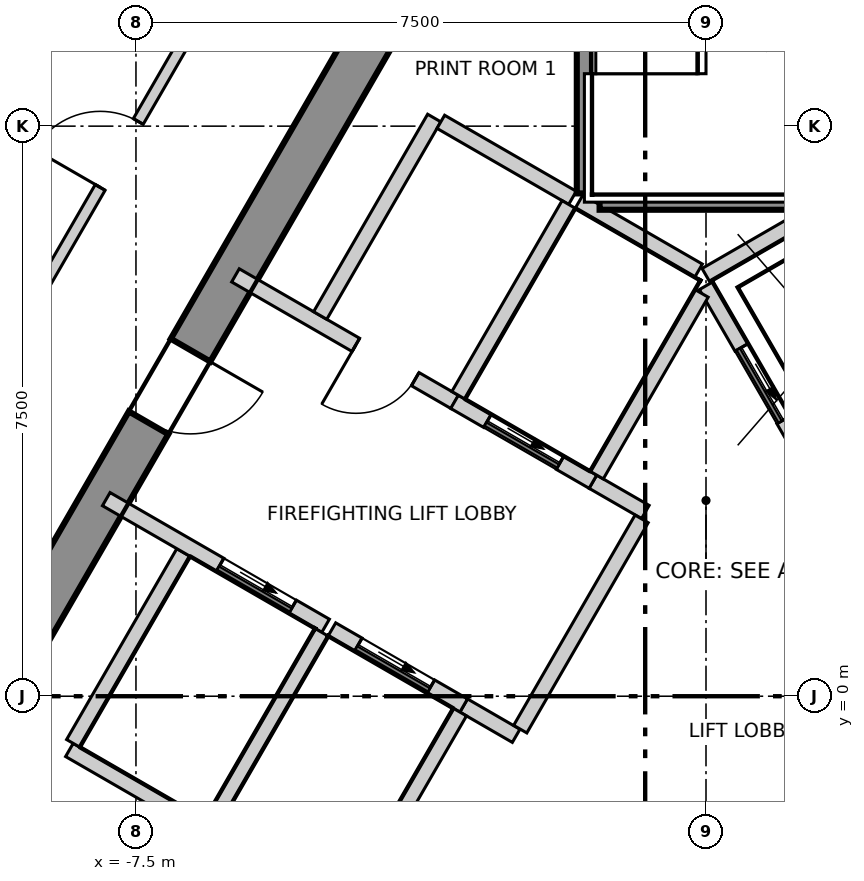
"""IFC4 building model, lengths in metres.
Left out: names, types, materials, properties, quantities, classifications, styles, units other than length and angle.
Written with IfcOpenShell. Run it as: python <this file> out.ifc"""

import sys

from ifc_helpers import new_model, si_unit, direction, frame, frame_2d, origin, place, context, subcontext, project, spatial, polyline, rectangle, outline, extrude, element, fill, save


model = new_model("IFC4")
c1 = context("Model", 3, precision=1e-05, world=origin(), true_north=direction((0.0, 1.0)))
c2 = subcontext(c1, "Body", "Model", "MODEL_VIEW")
j1 = project(units=[si_unit("LENGTHUNIT", "METRE"), si_unit("PLANEANGLEUNIT", "RADIAN")], contexts=[c1])
p1 = place(None, origin())
s1 = spatial("IfcSite", under=j1, at=p1, CompositionType="ELEMENT")
p2 = place(p1, origin())
s2 = spatial("IfcBuilding", under=s1, at=p2, CompositionType="ELEMENT")
p3 = place(p2, frame((0.0, 0.0, 268.3)))
s3 = spatial("IfcBuildingStorey", under=s2, at=p3, CompositionType="ELEMENT", Elevation=268.3)
p4 = place(p3, frame((-1.732, 13.3, -0.3), z_axis=(0.0, 0.0, 1.0), x_axis=(-0.500000539815, -0.866025092122, 0.0)))
e1 = element("IfcWall", 1, at=p4, inside=s3, PredefinedType="SHEAR", context=c2, shape_type="SweptSolid", body=[
    extrude(outline(polyline([(-0.173, -0.3), (1.795, -0.3), (3.763, -0.3), (5.732, -0.3), (7.7, -0.3), (9.668, -0.301), (11.637, -0.301), (13.605, -0.301), (15.573, -0.301), (17.542, -0.301), (19.51, -0.301), (21.478, -0.301), (21.131, 0.3), (19.226, 0.3), (17.321, 0.3), (15.415, 0.3), (13.51, 0.3), (11.605, 0.3), (9.699, 0.3), (7.794, 0.3), (5.889, 0.3), (3.984, 0.3), (2.078, 0.3), (0.173, 0.3), (-0.173, -0.3)])), origin(), (0.0, 0.0, 1.0), 3.6),
])
p5 = place(p4, frame((10.102, 0.0, 0.3)))
e2 = element("IfcOpeningElement", 2, at=p5, cuts=e1, PredefinedType="OPENING", context=c2, shape_type="SweptSolid", body=[
    extrude(rectangle(XDim=1.1, YDim=2.1, at=frame_2d((0.55, 1.05))), frame((0.0, 0.31, 0.0), z_axis=(0.0, -1.0, 0.0), x_axis=(1.0, 0.0, 0.0)), (0.0, 0.0, 1.0), 0.621),
])
p6 = place(p4, frame((16.378, 0.0, 0.3)))
e3 = element("IfcOpeningElement", 3, at=p6, cuts=e1, PredefinedType="OPENING", context=c2, shape_type="SweptSolid", body=[
    extrude(rectangle(XDim=0.9, YDim=2.1, at=frame_2d((0.45, 1.05))), frame((0.0, 0.31, 0.0), z_axis=(0.0, -1.0, 0.0), x_axis=(1.0, 0.0, 0.0)), (0.0, 0.0, 1.0), 0.621),
])
p7 = place(p4, frame((4.026, 0.0, 0.3)))
e4 = element("IfcOpeningElement", 4, at=p7, cuts=e1, PredefinedType="OPENING", context=c2, shape_type="SweptSolid", body=[
    extrude(rectangle(XDim=0.9, YDim=2.1, at=frame_2d((0.45, 1.05))), frame((0.0, 0.31, 0.0), z_axis=(0.0, -1.0, 0.0), x_axis=(1.0, 0.0, 0.0)), (0.0, 0.0, 1.0), 0.621),
])
p8 = place(p3, frame((-2.577, 28.771, 0.0), z_axis=(0.0, 0.0, 1.0), x_axis=(-0.49999909388, -0.866025926932, 0.0)))
e5 = element("IfcWall", 5, at=p8, inside=s3, PredefinedType="ELEMENTEDWALL", context=c2, shape_type="SweptSolid", body=[
    extrude(rectangle(XDim=47.236, YDim=0.2, at=frame_2d((23.618, 0.0))), origin(), (0.0, 0.0, 1.0), 3.3),
])
p9 = place(p8, frame((2.243, 0.0, 0.9)))
e6 = element("IfcOpeningElement", 6, at=p9, cuts=e5, PredefinedType="OPENING", context=c2, shape_type="SweptSolid", body=[
    extrude(rectangle(XDim=3.7, YDim=2.2, at=frame_2d((1.85, 1.1))), frame((0.0, 0.11, 0.0), z_axis=(0.0, -1.0, 0.0), x_axis=(1.0, 0.0, 0.0)), (0.0, 0.0, 1.0), 0.22),
])
p10 = place(p8, frame((7.824, 0.0, 0.9)))
e7 = element("IfcOpeningElement", 7, at=p10, cuts=e5, PredefinedType="OPENING", context=c2, shape_type="SweptSolid", body=[
    extrude(rectangle(XDim=3.7, YDim=2.2, at=frame_2d((1.85, 1.1))), frame((0.0, 0.11, 0.0), z_axis=(0.0, -1.0, 0.0), x_axis=(1.0, 0.0, 0.0)), (0.0, 0.0, 1.0), 0.22),
])
p11 = place(p8, frame((13.406, 0.0, 0.9)))
e8 = element("IfcOpeningElement", 8, at=p11, cuts=e5, PredefinedType="OPENING", context=c2, shape_type="SweptSolid", body=[
    extrude(rectangle(XDim=3.7, YDim=2.2, at=frame_2d((1.85, 1.1))), frame((0.0, 0.11, 0.0), z_axis=(0.0, -1.0, 0.0), x_axis=(1.0, 0.0, 0.0)), (0.0, 0.0, 1.0), 0.22),
])
p12 = place(p8, frame((18.987, 0.0, 0.9)))
e9 = element("IfcOpeningElement", 9, at=p12, cuts=e5, PredefinedType="OPENING", context=c2, shape_type="SweptSolid", body=[
    extrude(rectangle(XDim=3.7, YDim=2.2, at=frame_2d((1.85, 1.1))), frame((0.0, 0.11, 0.0), z_axis=(0.0, -1.0, 0.0), x_axis=(1.0, 0.0, 0.0)), (0.0, 0.0, 1.0), 0.22),
])
p13 = place(p8, frame((24.569, 0.0, 0.9)))
e10 = element("IfcOpeningElement", 10, at=p13, cuts=e5, PredefinedType="OPENING", context=c2, shape_type="SweptSolid", body=[
    extrude(rectangle(XDim=3.7, YDim=2.2, at=frame_2d((1.85, 1.1))), frame((0.0, 0.11, 0.0), z_axis=(0.0, -1.0, 0.0), x_axis=(1.0, 0.0, 0.0)), (0.0, 0.0, 1.0), 0.22),
])
p14 = place(p8, frame((30.15, 0.0, 0.9)))
e11 = element("IfcOpeningElement", 11, at=p14, cuts=e5, PredefinedType="OPENING", context=c2, shape_type="SweptSolid", body=[
    extrude(rectangle(XDim=3.7, YDim=2.2, at=frame_2d((1.85, 1.1))), frame((0.0, 0.11, 0.0), z_axis=(0.0, -1.0, 0.0), x_axis=(1.0, 0.0, 0.0)), (0.0, 0.0, 1.0), 0.22),
])
p15 = place(p8, frame((35.731, 0.0, 0.9)))
e12 = element("IfcOpeningElement", 12, at=p15, cuts=e5, PredefinedType="OPENING", context=c2, shape_type="SweptSolid", body=[
    extrude(rectangle(XDim=3.7, YDim=2.2, at=frame_2d((1.85, 1.1))), frame((0.0, 0.11, 0.0), z_axis=(0.0, -1.0, 0.0), x_axis=(1.0, 0.0, 0.0)), (0.0, 0.0, 1.0), 0.22),
])
p16 = place(p8, frame((41.313, 0.0, 0.9)))
e13 = element("IfcOpeningElement", 13, at=p16, cuts=e5, PredefinedType="OPENING", context=c2, shape_type="SweptSolid", body=[
    extrude(rectangle(XDim=3.7, YDim=2.2, at=frame_2d((1.85, 1.1))), frame((0.0, 0.11, 0.0), z_axis=(0.0, -1.0, 0.0), x_axis=(1.0, 0.0, 0.0)), (0.0, 0.0, 1.0), 0.22),
])
p17 = place(p3, frame((-17.678, -10.12, 0.0), z_axis=(0.0, 0.0, 1.0), x_axis=(0.49998824015, 0.86603219323, 0.0)))
e14 = element("IfcWall", 14, at=p17, inside=s3, PredefinedType="PARTITIONING", context=c2, shape_type="SweptSolid", body=[
    extrude(rectangle(XDim=35.357, YDim=0.15, at=frame_2d((17.678, 0.0))), origin(), (0.0, 0.0, 1.0), 3.3),
])
p18 = place(p17, frame((31.607, 0.0, 0.0)))
e15 = element("IfcOpeningElement", 15, at=p18, cuts=e14, PredefinedType="OPENING", context=c2, shape_type="SweptSolid", body=[
    extrude(rectangle(XDim=1.0, YDim=2.1, at=frame_2d((0.5, 1.05))), frame((0.0, 0.085, 0.0), z_axis=(0.0, -1.0, 0.0), x_axis=(1.0, 0.0, 0.0)), (0.0, 0.0, 1.0), 0.17),
])
p19 = place(p17, frame((19.416, 0.0, 0.0)))
e16 = element("IfcOpeningElement", 16, at=p19, cuts=e14, PredefinedType="OPENING", context=c2, shape_type="SweptSolid", body=[
    extrude(rectangle(XDim=1.0, YDim=2.1, at=frame_2d((0.5, 1.05))), frame((0.0, 0.085, 0.0), z_axis=(0.0, -1.0, 0.0), x_axis=(1.0, 0.0, 0.0)), (0.0, 0.0, 1.0), 0.17),
])
p20 = place(p17, frame((24.916, 0.0, 0.0)))
e17 = element("IfcOpeningElement", 17, at=p20, cuts=e14, PredefinedType="OPENING", context=c2, shape_type="SweptSolid", body=[
    extrude(rectangle(XDim=0.9, YDim=2.1, at=frame_2d((0.45, 1.05))), frame((0.0, 0.085, 0.0), z_axis=(0.0, -1.0, 0.0), x_axis=(1.0, 0.0, 0.0)), (0.0, 0.0, 1.0), 0.17),
])
p21 = place(p17, frame((22.816, 0.0, 0.0)))
e18 = element("IfcOpeningElement", 18, at=p21, cuts=e14, PredefinedType="OPENING", context=c2, shape_type="SweptSolid", body=[
    extrude(rectangle(XDim=0.9, YDim=2.1, at=frame_2d((0.45, 1.05))), frame((0.0, 0.085, 0.0), z_axis=(0.0, -1.0, 0.0), x_axis=(1.0, 0.0, 0.0)), (0.0, 0.0, 1.0), 0.17),
])
p22 = place(p17, frame((14.654, 0.0, 0.0)))
e19 = element("IfcOpeningElement", 19, at=p22, cuts=e14, PredefinedType="OPENING", context=c2, shape_type="SweptSolid", body=[
    extrude(rectangle(XDim=1.0, YDim=2.1, at=frame_2d((0.5, 1.05))), frame((0.0, 0.085, 0.0), z_axis=(0.0, -1.0, 0.0), x_axis=(1.0, 0.0, 0.0)), (0.0, 0.0, 1.0), 0.17),
])
p23 = place(p17, frame((7.672, 0.0, 0.0)))
e20 = element("IfcOpeningElement", 20, at=p23, cuts=e14, PredefinedType="OPENING", context=c2, shape_type="SweptSolid", body=[
    extrude(rectangle(XDim=1.0, YDim=2.1, at=frame_2d((0.5, 1.05))), frame((0.0, 0.085, 0.0), z_axis=(0.0, -1.0, 0.0), x_axis=(1.0, 0.0, 0.0)), (0.0, 0.0, 1.0), 0.17),
])
p24 = place(p17, frame((2.69, 0.0, 0.0)))
e21 = element("IfcOpeningElement", 21, at=p24, cuts=e14, PredefinedType="OPENING", context=c2, shape_type="SweptSolid", body=[
    extrude(rectangle(XDim=1.0, YDim=2.1, at=frame_2d((0.5, 1.05))), frame((0.0, 0.085, 0.0), z_axis=(0.0, -1.0, 0.0), x_axis=(1.0, 0.0, 0.0)), (0.0, 0.0, 1.0), 0.17),
])
p25 = place(p3, frame((0.075, 20.37, 0.0), z_axis=(0.0, 0.0, 1.0), x_axis=(0.499988971979, -0.866031770721, 0.0)))
e22 = element("IfcWall", 22, at=p25, inside=s3, PredefinedType="PARTITIONING", context=c2, shape_type="SweptSolid", body=[
    extrude(rectangle(XDim=35.207, YDim=0.15, at=frame_2d((17.604, 0.0))), origin(), (0.0, 0.0, 1.0), 3.3),
])
p26 = place(p25, frame((31.606, 0.0, 0.0)))
e23 = element("IfcOpeningElement", 23, at=p26, cuts=e22, PredefinedType="OPENING", context=c2, shape_type="SweptSolid", body=[
    extrude(rectangle(XDim=1.0, YDim=2.1, at=frame_2d((0.5, 1.05))), frame((0.0, 0.085, 0.0), z_axis=(0.0, -1.0, 0.0), x_axis=(1.0, 0.0, 0.0)), (0.0, 0.0, 1.0), 0.17),
])
p27 = place(p25, frame((24.316, 0.0, 0.0)))
e24 = element("IfcOpeningElement", 24, at=p27, cuts=e22, PredefinedType="OPENING", context=c2, shape_type="SweptSolid", body=[
    extrude(rectangle(XDim=1.0, YDim=2.1, at=frame_2d((0.5, 1.05))), frame((0.0, 0.085, 0.0), z_axis=(0.0, -1.0, 0.0), x_axis=(1.0, 0.0, 0.0)), (0.0, 0.0, 1.0), 0.17),
])
p28 = place(p25, frame((18.735, 0.0, 0.0)))
e25 = element("IfcOpeningElement", 25, at=p28, cuts=e22, PredefinedType="OPENING", context=c2, shape_type="SweptSolid", body=[
    extrude(rectangle(XDim=1.0, YDim=2.1, at=frame_2d((0.5, 1.05))), frame((0.0, 0.085, 0.0), z_axis=(0.0, -1.0, 0.0), x_axis=(1.0, 0.0, 0.0)), (0.0, 0.0, 1.0), 0.17),
])
p29 = place(p25, frame((8.154, 0.0, 0.0)))
e26 = element("IfcOpeningElement", 26, at=p29, cuts=e22, PredefinedType="OPENING", context=c2, shape_type="SweptSolid", body=[
    extrude(rectangle(XDim=1.0, YDim=2.1, at=frame_2d((0.5, 1.05))), frame((0.0, 0.085, 0.0), z_axis=(0.0, -1.0, 0.0), x_axis=(1.0, 0.0, 0.0)), (0.0, 0.0, 1.0), 0.17),
])
p30 = place(p25, frame((13.754, 0.0, 0.0)))
e27 = element("IfcOpeningElement", 27, at=p30, cuts=e22, PredefinedType="OPENING", context=c2, shape_type="SweptSolid", body=[
    extrude(rectangle(XDim=0.9, YDim=2.1, at=frame_2d((0.45, 1.05))), frame((0.0, 0.085, 0.0), z_axis=(0.0, -1.0, 0.0), x_axis=(1.0, 0.0, 0.0)), (0.0, 0.0, 1.0), 0.17),
])
p31 = place(p25, frame((11.554, 0.0, 0.0)))
e28 = element("IfcOpeningElement", 28, at=p31, cuts=e22, PredefinedType="OPENING", context=c2, shape_type="SweptSolid", body=[
    extrude(rectangle(XDim=0.9, YDim=2.1, at=frame_2d((0.45, 1.05))), frame((0.0, 0.085, 0.0), z_axis=(0.0, -1.0, 0.0), x_axis=(1.0, 0.0, 0.0)), (0.0, 0.0, 1.0), 0.17),
])
p32 = place(p25, frame((2.69, 0.0, 0.0)))
e29 = element("IfcOpeningElement", 29, at=p32, cuts=e22, PredefinedType="OPENING", context=c2, shape_type="SweptSolid", body=[
    extrude(rectangle(XDim=1.0, YDim=2.1, at=frame_2d((0.5, 1.05))), frame((0.0, 0.085, 0.0), z_axis=(0.0, -1.0, 0.0), x_axis=(1.0, 0.0, 0.0)), (0.0, 0.0, 1.0), 0.17),
])
p33 = place(p3, frame((-8.376, -0.707, 0.0), z_axis=(0.0, 0.0, 1.0), x_axis=(0.866067520717, -0.499927044236, 0.0)))
e30 = element("IfcWall", 30, at=p33, inside=s3, PredefinedType="SOLIDWALL", context=c2, shape_type="SweptSolid", body=[
    extrude(rectangle(XDim=2.1, YDim=0.2, at=frame_2d((1.05, 0.0))), origin(), (0.0, 0.0, 1.0), 3.3),
])
p34 = place(p3, frame((-8.326, -0.62, 0.0), z_axis=(0.0, 0.0, 1.0), x_axis=(0.500023687443, 0.866011727401, 0.0)))
e31 = element("IfcWall", 31, at=p34, inside=s3, PredefinedType="SOLIDWALL", context=c2, shape_type="SweptSolid", body=[
    extrude(rectangle(XDim=2.9, YDim=0.2, at=frame_2d((1.45, 0.0))), origin(), (0.0, 0.0, 1.0), 3.3),
])
p35 = place(p3, frame((-0.002, 5.541, 0.0), z_axis=(0.0, 0.0, 1.0), x_axis=(0.86600155993, 0.500041296494, 0.0)))
e32 = element("IfcWall", 32, at=p35, inside=s3, PredefinedType="SOLIDWALL", context=c2, shape_type="SweptSolid", body=[
    extrude(rectangle(XDim=4.132, YDim=0.2, at=frame_2d((2.066, 0.0))), origin(), (0.0, 0.0, 1.0), 3.3),
])
p36 = place(p3, frame((0.0, 5.4, 0.0), z_axis=(0.0, 0.0, 1.0), x_axis=(0.500103862429, -0.865965430478, 0.0)))
e33 = element("IfcWall", 33, at=p36, inside=s3, PredefinedType="SOLIDWALL", context=c2, shape_type="SweptSolid", body=[
    extrude(rectangle(XDim=2.973, YDim=0.2, at=frame_2d((1.487, 0.0))), origin(), (0.0, 0.0, 1.0), 3.3),
])
p37 = place(p36, frame((0.937, 0.0, 0.0)))
e34 = element("IfcOpeningElement", 34, at=p37, cuts=e33, PredefinedType="OPENING", context=c2, shape_type="SweptSolid", body=[
    extrude(rectangle(XDim=1.1, YDim=2.1, at=frame_2d((0.55, 1.05))), frame((0.0, 0.11, 0.0), z_axis=(0.0, -1.0, 0.0), x_axis=(1.0, 0.0, 0.0)), (0.0, 0.0, 1.0), 0.22),
])
p38 = place(p3, frame((-7.891, 2.593, 0.0), z_axis=(0.0, 0.0, 1.0), x_axis=(0.866070917804, -0.499921159118, 0.0)))
e35 = element("IfcWall", 35, at=p38, inside=s3, PredefinedType="SOLIDWALL", context=c2, shape_type="SweptSolid", body=[
    extrude(rectangle(XDim=3.333, YDim=0.2, at=frame_2d((1.666, 0.0))), origin(), (0.0, 0.0, 1.0), 3.3),
])
p39 = place(p38, frame((1.73, 0.0, 0.0)))
e36 = element("IfcOpeningElement", 36, at=p39, cuts=e35, PredefinedType="OPENING", context=c2, shape_type="SweptSolid", body=[
    extrude(rectangle(XDim=1.1, YDim=2.1, at=frame_2d((0.55, 1.05))), frame((0.0, 0.11, 0.0), z_axis=(0.0, -1.0, 0.0), x_axis=(1.0, 0.0, 0.0)), (0.0, 0.0, 1.0), 0.22),
])
p40 = place(p3, frame((-3.188, -0.122, 0.0), z_axis=(0.0, 0.0, 1.0), x_axis=(0.865705793592, -0.50055317294, 0.0)))
e37 = element("IfcWall", 37, at=p40, inside=s3, PredefinedType="SOLIDWALL", context=c2, shape_type="SweptSolid", body=[
    extrude(rectangle(XDim=0.797, YDim=0.2, at=frame_2d((0.398, 0.0))), origin(), (0.0, 0.0, 1.0), 3.3),
])
p41 = place(p3, frame((-6.191, 5.537, 0.0), z_axis=(0.0, 0.0, 1.0), x_axis=(0.866052607023, -0.499952879648, 0.0)))
e38 = element("IfcWall", 38, at=p41, inside=s3, PredefinedType="SOLIDWALL", context=c2, shape_type="SweptSolid", body=[
    extrude(rectangle(XDim=3.332, YDim=0.2, at=frame_2d((1.666, 0.0))), origin(), (0.0, 0.0, 1.0), 3.3),
])
p42 = place(p41, frame((1.83, 0.0, 0.0)))
e39 = element("IfcOpeningElement", 39, at=p42, cuts=e38, PredefinedType="OPENING", context=c2, shape_type="SweptSolid", body=[
    extrude(rectangle(XDim=0.9, YDim=2.1, at=frame_2d((0.45, 1.05))), frame((0.0, 0.11, 0.0), z_axis=(0.0, -1.0, 0.0), x_axis=(1.0, 0.0, 0.0)), (0.0, 0.0, 1.0), 0.22),
])
p43 = place(p3, frame((-1.488, 2.822, 0.0), z_axis=(0.0, 0.0, 1.0), x_axis=(0.866236612152, -0.499633997809, 0.0)))
e40 = element("IfcWall", 40, at=p43, inside=s3, PredefinedType="SOLIDWALL", context=c2, shape_type="SweptSolid", body=[
    extrude(rectangle(XDim=0.796, YDim=0.2, at=frame_2d((0.398, 0.0))), origin(), (0.0, 0.0, 1.0), 3.3),
])
p44 = place(p3, frame((-5.076, 5.009, 0.0), z_axis=(0.0, 0.0, 1.0), x_axis=(0.50002537861, 0.866010750942, 0.0)))
e41 = element("IfcWall", 41, at=p44, inside=s3, PredefinedType="SOLIDWALL", context=c2, shape_type="SweptSolid", body=[
    extrude(rectangle(XDim=3.0, YDim=0.2, at=frame_2d((1.5, 0.0))), origin(), (0.0, 0.0, 1.0), 3.3),
])
p45 = place(p3, frame((-3.489, 7.557, 0.0), z_axis=(0.0, 0.0, 1.0), x_axis=(0.866010750942, -0.50002537861, 0.0)))
e42 = element("IfcWall", 42, at=p45, inside=s3, PredefinedType="SOLIDWALL", context=c2, shape_type="SweptSolid", body=[
    extrude(rectangle(XDim=2.0, YDim=0.2, at=frame_2d((1.0, 0.0))), origin(), (0.0, 0.0, 1.0), 3.3),
])
p46 = place(p3, frame((-2.444, -0.433, 0.0), z_axis=(0.0, 0.0, 1.0), x_axis=(0.500035624827, 0.866004834804, 0.0)))
e43 = element("IfcWall", 43, at=p46, inside=s3, PredefinedType="SOLIDWALL", context=c2, shape_type="SweptSolid", body=[
    extrude(rectangle(XDim=3.194, YDim=0.2, at=frame_2d((1.597, 0.0))), origin(), (0.0, 0.0, 1.0), 3.3),
])
p47 = place(p3, frame((-6.507, -1.67, 0.0), z_axis=(0.0, 0.0, 1.0), x_axis=(0.50012328804, 0.865954211699, 0.0)))
e44 = element("IfcWall", 44, at=p47, inside=s3, PredefinedType="SOLIDWALL", context=c2, shape_type="SweptSolid", body=[
    extrude(rectangle(XDim=2.9, YDim=0.2, at=frame_2d((1.45, 0.0))), origin(), (0.0, 0.0, 1.0), 3.3),
])
p48 = place(p3, frame((-4.922, 0.879, 0.0), z_axis=(0.0, 0.0, 1.0), x_axis=(0.866073918653, -0.499915960366, 0.0)))
e45 = element("IfcWall", 45, at=p48, inside=s3, PredefinedType="SOLIDWALL", context=c2, shape_type="SweptSolid", body=[
    extrude(rectangle(XDim=2.002, YDim=0.2, at=frame_2d((1.001, 0.0))), origin(), (0.0, 0.0, 1.0), 3.3),
])
p49 = place(p48, frame((0.402, 0.0, 0.0)))
e46 = element("IfcOpeningElement", 46, at=p49, cuts=e45, PredefinedType="OPENING", context=c2, shape_type="SweptSolid", body=[
    extrude(rectangle(XDim=1.1, YDim=2.1, at=frame_2d((0.55, 1.05))), frame((0.0, 0.11, 0.0), z_axis=(0.0, -1.0, 0.0), x_axis=(1.0, 0.0, 0.0)), (0.0, 0.0, 1.0), 0.22),
])
p50 = place(p3, frame((-4.619, -2.6, 0.0), z_axis=(0.0, 0.0, 1.0), x_axis=(0.50009492287, 0.865970593103, 0.0)))
e47 = element("IfcWall", 47, at=p50, inside=s3, PredefinedType="SOLIDWALL", context=c2, shape_type="SweptSolid", body=[
    extrude(rectangle(XDim=2.761, YDim=0.2, at=frame_2d((1.381, 0.0))), origin(), (0.0, 0.0, 1.0), 3.3),
])
p51 = place(p3, frame((-3.309, 3.873, 0.0), z_axis=(0.0, 0.0, 1.0), x_axis=(0.866098583652, -0.499873227325, 0.0)))
e48 = element("IfcWall", 48, at=p51, inside=s3, PredefinedType="SOLIDWALL", context=c2, shape_type="SweptSolid", body=[
    extrude(rectangle(XDim=2.103, YDim=0.2, at=frame_2d((1.051, 0.0))), origin(), (0.0, 0.0, 1.0), 3.3),
])
p52 = place(p51, frame((0.502, 0.0, 0.0)))
e49 = element("IfcOpeningElement", 49, at=p52, cuts=e48, PredefinedType="OPENING", context=c2, shape_type="SweptSolid", body=[
    extrude(rectangle(XDim=1.1, YDim=2.1, at=frame_2d((0.55, 1.05))), frame((0.0, 0.11, 0.0), z_axis=(0.0, -1.0, 0.0), x_axis=(1.0, 0.0, 0.0)), (0.0, 0.0, 1.0), 0.22),
])
p53 = place(p3, frame((-3.257, 3.959, 0.0), z_axis=(0.0, 0.0, 1.0), x_axis=(0.50012328804, 0.865954211699, 0.0)))
e50 = element("IfcWall", 50, at=p53, inside=s3, PredefinedType="SOLIDWALL", context=c2, shape_type="SweptSolid", body=[
    extrude(rectangle(XDim=2.9, YDim=0.2, at=frame_2d((1.45, 0.0))), origin(), (0.0, 0.0, 1.0), 3.3),
])
p54 = place(p3, frame((-1.67, 6.507, 0.0), z_axis=(0.0, 0.0, 1.0), x_axis=(0.865941441609, -0.500145398563, 0.0)))
e51 = element("IfcWall", 51, at=p54, inside=s3, PredefinedType="SOLIDWALL", context=c2, shape_type="SweptSolid", body=[
    extrude(rectangle(XDim=1.815, YDim=0.2, at=frame_2d((0.908, 0.0))), origin(), (0.0, 0.0, 1.0), 3.3),
])
p55 = place(p3, frame((-1.438, 2.909, 0.0), z_axis=(0.0, 0.0, 1.0), x_axis=(0.499829630636, 0.866123744241, 0.0)))
e52 = element("IfcWall", 52, at=p55, inside=s3, PredefinedType="SOLIDWALL", context=c2, shape_type="SweptSolid", body=[
    extrude(rectangle(XDim=2.761, YDim=0.2, at=frame_2d((1.38, 0.0))), origin(), (0.0, 0.0, 1.0), 3.3),
])
p56 = place(p3, frame((-1.4, 6.5, 0.0), z_axis=(0.0, 0.0, 1.0), x_axis=(1.0, 0.0, 0.0)))
e53 = element("IfcWall", 53, at=p56, inside=s3, PredefinedType="SOLIDWALL", context=c2, shape_type="SweptSolid", body=[
    extrude(rectangle(XDim=2.8, YDim=0.2, at=frame_2d((1.4, 0.0))), origin(), (0.0, 0.0, 1.0), 3.3),
])
p57 = place(p3, frame((-1.6, 6.615, 0.0), z_axis=(0.0, 0.0, 1.0), x_axis=(0.0, 1.0, 0.0)))
e54 = element("IfcWall", 54, at=p57, inside=s3, PredefinedType="SOLIDWALL", context=c2, shape_type="SweptSolid", body=[
    extrude(rectangle(XDim=6.665, YDim=0.2, at=frame_2d((3.333, 0.0))), origin(), (0.0, 0.0, 1.0), 3.3),
])
p58 = place(p37, origin())
e55 = element("IfcDoor", 55, at=p58, inside=s3, OperationType="SLIDING_TO_LEFT", PredefinedType="DOOR", context=c2, shape_type="SweptSolid", body=[
    extrude(rectangle(XDim=1.1, YDim=2.1, at=frame_2d((0.55, 1.05))), frame((0.0, 0.025, 0.0), z_axis=(0.0, -1.0, 0.0), x_axis=(1.0, 0.0, 0.0)), (0.0, 0.0, 1.0), 0.05),
])
fill(e34, e55)
p59 = place(p49, origin())
e56 = element("IfcDoor", 56, at=p59, inside=s3, OperationType="SLIDING_TO_LEFT", PredefinedType="DOOR", context=c2, shape_type="SweptSolid", body=[
    extrude(rectangle(XDim=1.1, YDim=2.1, at=frame_2d((0.55, 1.05))), frame((0.0, 0.025, 0.0), z_axis=(0.0, -1.0, 0.0), x_axis=(1.0, 0.0, 0.0)), (0.0, 0.0, 1.0), 0.05),
])
fill(e46, e56)
p60 = place(p52, origin())
e57 = element("IfcDoor", 57, at=p60, inside=s3, OperationType="SLIDING_TO_LEFT", PredefinedType="DOOR", context=c2, shape_type="SweptSolid", body=[
    extrude(rectangle(XDim=1.1, YDim=2.1, at=frame_2d((0.55, 1.05))), frame((0.0, 0.025, 0.0), z_axis=(0.0, -1.0, 0.0), x_axis=(1.0, 0.0, 0.0)), (0.0, 0.0, 1.0), 0.05),
])
fill(e49, e57)
p61 = place(p39, origin())
e58 = element("IfcDoor", 58, at=p61, inside=s3, OperationType="SLIDING_TO_LEFT", PredefinedType="DOOR", context=c2, shape_type="SweptSolid", body=[
    extrude(rectangle(XDim=1.1, YDim=2.1, at=frame_2d((0.55, 1.05))), frame((0.0, 0.025, 0.0), z_axis=(0.0, -1.0, 0.0), x_axis=(1.0, 0.0, 0.0)), (0.0, 0.0, 1.0), 0.05),
])
fill(e36, e58)
p62 = place(p42, origin())
e59 = element("IfcDoor", 59, at=p62, inside=s3, OperationType="SINGLE_SWING_LEFT", PredefinedType="DOOR", context=c2, shape_type="SweptSolid", body=[
    extrude(rectangle(XDim=0.9, YDim=2.1, at=frame_2d((0.45, 1.05))), frame((0.0, 0.025, 0.0), z_axis=(0.0, -1.0, 0.0), x_axis=(1.0, 0.0, 0.0)), (0.0, 0.0, 1.0), 0.05),
])
fill(e39, e59)
p63 = place(p19, origin())
e60 = element("IfcDoor", 60, at=p63, inside=s3, OperationType="SINGLE_SWING_RIGHT", PredefinedType="DOOR", context=c2, shape_type="SweptSolid", body=[
    extrude(rectangle(XDim=1.0, YDim=2.1, at=frame_2d((0.5, 1.05))), frame((0.0, 0.025, 0.0), z_axis=(0.0, -1.0, 0.0), x_axis=(1.0, 0.0, 0.0)), (0.0, 0.0, 1.0), 0.05),
])
fill(e16, e60)
p64 = place(p5, origin())
e61 = element("IfcDoor", 61, at=p64, inside=s3, OperationType="SINGLE_SWING_RIGHT", PredefinedType="DOOR", context=c2, shape_type="SweptSolid", body=[
    extrude(rectangle(XDim=1.1, YDim=2.1, at=frame_2d((0.55, 1.05))), frame((0.0, 0.025, 0.0), z_axis=(0.0, -1.0, 0.0), x_axis=(1.0, 0.0, 0.0)), (0.0, 0.0, 1.0), 0.05),
])
fill(e2, e61)
save(model, sys.argv[1])
